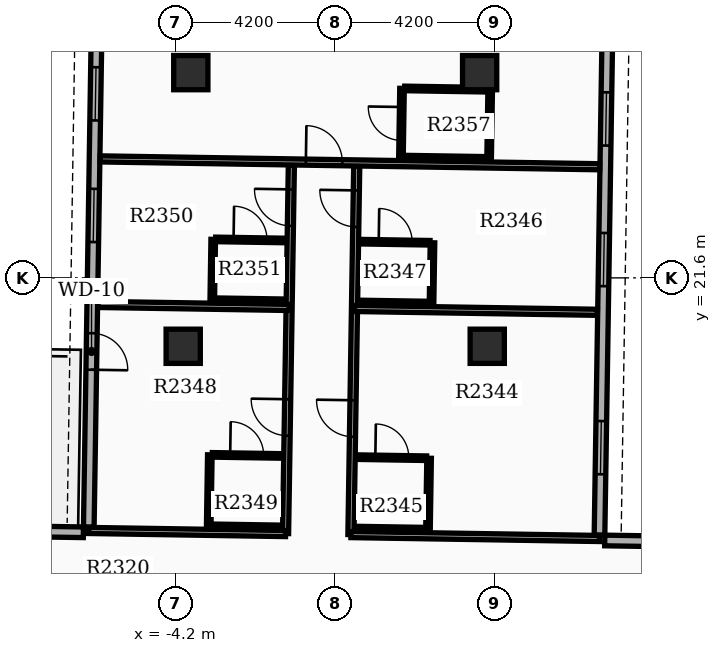
"""IFC4 building model, lengths in metres.
Left out: names, types, materials, properties, quantities, classifications, styles, units other than length and angle.
Written with IfcOpenShell. Run it as: python <this file> out.ifc"""

import sys

from ifc_helpers import new_model, si_unit, direction, frame, frame_2d, origin, origin_2d, place, context, subcontext, project, spatial, rectangle, extrude, element, fill, save


model = new_model("IFC4")
c1 = context("Model", 3, precision=1e-05, world=origin(), true_north=direction((0.0, 1.0)))
c2 = subcontext(c1, "Body", "Model", "MODEL_VIEW")
j1 = project(units=[si_unit("LENGTHUNIT", "METRE"), si_unit("PLANEANGLEUNIT", "RADIAN")], contexts=[c1])
p1 = place(None, origin())
s1 = spatial("IfcSite", under=j1, at=p1, CompositionType="ELEMENT")
p2 = place(p1, origin())
s2 = spatial("IfcBuilding", under=s1, at=p2, CompositionType="ELEMENT")
p3 = place(p2, frame((0.0, 0.0, 148.8)))
s3 = spatial("IfcBuildingStorey", under=s2, at=p3, CompositionType="ELEMENT", Elevation=148.8)
for number, where, z_axis, x_axis in (
    (1, (-4.0, 19.8, 0.0), (0.0, 0.0, 1.0), (1.0, 0.0, 0.0)),
    (2, (4.0, 19.8, 0.0), (0.0, 0.0, 1.0), (1.0, 0.0, 0.0)),
    (3, (-3.8, 27.0, 0.0), (0.0, 0.0, 1.0), (1.0, 0.0, 0.0)),
    (4, (3.8, 27.0, 0.0), (0.0, 0.0, 1.0), (1.0, 0.0, 0.0)),
):
    element("IfcColumn", number, at=place(p3, frame(where, z_axis=z_axis, x_axis=x_axis)), inside=s3, PredefinedType="COLUMN", context=c2, shape_type="SweptSolid", body=[
        extrude(rectangle(XDim=0.9, YDim=0.9, at=origin_2d()), origin(), (0.0, 0.0, 1.0), 3.9),
    ])
p4 = place(p3, frame((6.954, 14.833, 0.0), z_axis=(0.0, 0.0, 1.0), x_axis=(0.015705059908, 0.999876667941, 0.0)))
e5 = element("IfcWall", 5, at=p4, inside=s3, PredefinedType="STANDARD", context=c2, shape_type="SweptSolid", body=[
    extrude(rectangle(XDim=20.1, YDim=0.28, at=frame_2d((10.05, 0.0))), origin(), (0.0, 0.0, 1.0), 2.97),
])
p5 = place(p4, frame((1.6, 0.0, 0.8)))
e6 = element("IfcOpeningElement", 6, at=p5, cuts=e5, PredefinedType="OPENING", context=c2, shape_type="SweptSolid", body=[
    extrude(rectangle(XDim=1.4, YDim=1.6, at=frame_2d((0.7, 0.8))), frame((0.0, 0.15, 0.0), z_axis=(0.0, -1.0, 0.0), x_axis=(1.0, 0.0, 0.0)), (0.0, 0.0, 1.0), 0.3),
])
p6 = place(p4, frame((6.55, 0.0, 0.8)))
e7 = element("IfcOpeningElement", 7, at=p6, cuts=e5, PredefinedType="OPENING", context=c2, shape_type="SweptSolid", body=[
    extrude(rectangle(XDim=1.4, YDim=1.6, at=frame_2d((0.7, 0.8))), frame((0.0, 0.15, 0.0), z_axis=(0.0, -1.0, 0.0), x_axis=(1.0, 0.0, 0.0)), (0.0, 0.0, 1.0), 0.3),
])
p7 = place(p4, frame((10.25, 0.0, 0.8)))
e8 = element("IfcOpeningElement", 8, at=p7, cuts=e5, PredefinedType="OPENING", context=c2, shape_type="SweptSolid", body=[
    extrude(rectangle(XDim=1.4, YDim=1.6, at=frame_2d((0.7, 0.8))), frame((0.0, 0.15, 0.0), z_axis=(0.0, -1.0, 0.0), x_axis=(1.0, 0.0, 0.0)), (0.0, 0.0, 1.0), 0.3),
])
p8 = place(p4, frame((13.45, 0.0, 0.8)))
e9 = element("IfcOpeningElement", 9, at=p8, cuts=e5, PredefinedType="OPENING", context=c2, shape_type="SweptSolid", body=[
    extrude(rectangle(XDim=1.4, YDim=1.6, at=frame_2d((0.7, 0.8))), frame((0.0, 0.15, 0.0), z_axis=(0.0, -1.0, 0.0), x_axis=(1.0, 0.0, 0.0)), (0.0, 0.0, 1.0), 0.3),
])
p9 = place(p3, frame((-6.169, 35.141, 0.0), z_axis=(0.0, 0.0, 1.0), x_axis=(-0.01571739401, -0.999876474133, 0.0)))
e10 = element("IfcWall", 10, at=p9, inside=s3, PredefinedType="STANDARD", context=c2, shape_type="SweptSolid", body=[
    extrude(rectangle(XDim=20.1, YDim=0.28, at=frame_2d((10.05, 0.0))), origin(), (0.0, 0.0, 1.0), 2.97),
])
p10 = place(p9, frame((1.6, 0.0, 0.8)))
e11 = element("IfcOpeningElement", 11, at=p10, cuts=e10, PredefinedType="OPENING", context=c2, shape_type="SweptSolid", body=[
    extrude(rectangle(XDim=1.4, YDim=1.6, at=frame_2d((0.7, 0.8))), frame((0.0, 0.15, 0.0), z_axis=(0.0, -1.0, 0.0), x_axis=(1.0, 0.0, 0.0)), (0.0, 0.0, 1.0), 0.3),
])
p11 = place(p9, frame((4.8, 0.0, 0.8)))
e12 = element("IfcOpeningElement", 12, at=p11, cuts=e10, PredefinedType="OPENING", context=c2, shape_type="SweptSolid", body=[
    extrude(rectangle(XDim=1.4, YDim=1.6, at=frame_2d((0.7, 0.8))), frame((0.0, 0.15, 0.0), z_axis=(0.0, -1.0, 0.0), x_axis=(1.0, 0.0, 0.0)), (0.0, 0.0, 1.0), 0.3),
])
p12 = place(p9, frame((8.0, 0.0, 0.8)))
e13 = element("IfcOpeningElement", 13, at=p12, cuts=e10, PredefinedType="OPENING", context=c2, shape_type="SweptSolid", body=[
    extrude(rectangle(XDim=1.4, YDim=1.6, at=frame_2d((0.7, 0.8))), frame((0.0, 0.15, 0.0), z_axis=(0.0, -1.0, 0.0), x_axis=(1.0, 0.0, 0.0)), (0.0, 0.0, 1.0), 0.3),
])
p13 = place(p9, frame((11.2, 0.0, 0.8)))
e14 = element("IfcOpeningElement", 14, at=p13, cuts=e10, PredefinedType="OPENING", context=c2, shape_type="SweptSolid", body=[
    extrude(rectangle(XDim=1.4, YDim=1.6, at=frame_2d((0.7, 0.8))), frame((0.0, 0.15, 0.0), z_axis=(0.0, -1.0, 0.0), x_axis=(1.0, 0.0, 0.0)), (0.0, 0.0, 1.0), 0.3),
])
p14 = place(p9, frame((15.0, 0.0, 0.0)))
e15 = element("IfcOpeningElement", 15, at=p14, cuts=e10, PredefinedType="OPENING", context=c2, shape_type="SweptSolid", body=[
    extrude(rectangle(XDim=0.96, YDim=2.1, at=frame_2d((0.48, 1.05))), frame((0.0, 0.15, 0.0), z_axis=(0.0, -1.0, 0.0), x_axis=(1.0, 0.0, 0.0)), (0.0, 0.0, 1.0), 0.3),
])
p15 = place(p3, frame((13.391, 14.592, 0.0), z_axis=(0.0, 0.0, 1.0), x_axis=(-0.999876833368, 0.015694524359, 0.0)))
e16 = element("IfcWall", 16, at=p15, inside=s3, PredefinedType="STANDARD", context=c2, shape_type="SweptSolid", body=[
    extrude(rectangle(XDim=6.3, YDim=0.28, at=frame_2d((3.15, 0.0))), origin(), (0.0, 0.0, 1.0), 2.97),
])
p16 = place(p3, frame((-12.926, 15.005, 0.0), z_axis=(0.0, 0.0, 1.0), x_axis=(0.999876823822, -0.015695132501, 0.0)))
e17 = element("IfcWall", 17, at=p16, inside=s3, PredefinedType="STANDARD", context=c2, shape_type="SweptSolid", body=[
    extrude(rectangle(XDim=6.3, YDim=0.28, at=frame_2d((3.15, 0.0))), origin(), (0.0, 0.0, 1.0), 2.97),
])
p17 = place(p3, frame((0.413, 14.845, 0.0), z_axis=(0.0, 0.0, 1.0), x_axis=(0.015730426869, 0.999876269181, 0.0)))
e18 = element("IfcWall", 18, at=p17, inside=s3, PredefinedType="PARTITIONING", context=c2, shape_type="SweptSolid", body=[
    extrude(rectangle(XDim=9.7, YDim=0.16, at=frame_2d((4.85, 0.0))), origin(), (0.0, 0.0, 1.0), 2.96),
])
p18 = place(p17, frame((2.575, 0.0, 0.0)))
e19 = element("IfcOpeningElement", 19, at=p18, cuts=e18, PredefinedType="OPENING", context=c2, shape_type="SweptSolid", body=[
    extrude(rectangle(XDim=0.96, YDim=2.15, at=frame_2d((0.48, 1.075))), frame((0.0, 0.09, 0.0), z_axis=(0.0, -1.0, 0.0), x_axis=(1.0, 0.0, 0.0)), (0.0, 0.0, 1.0), 0.18),
])
p19 = place(p17, frame((8.097, 0.0, 0.0)))
e20 = element("IfcOpeningElement", 20, at=p19, cuts=e18, PredefinedType="OPENING", context=c2, shape_type="SweptSolid", body=[
    extrude(rectangle(XDim=0.96, YDim=2.15, at=frame_2d((0.48, 1.075))), frame((0.0, 0.09, 0.0), z_axis=(0.0, -1.0, 0.0), x_axis=(1.0, 0.0, 0.0)), (0.0, 0.0, 1.0), 0.18),
])
p20 = place(p3, frame((0.413, 14.845, 0.0), z_axis=(0.0, 0.0, 1.0), x_axis=(0.999877084909, -0.015678490784, 0.0)))
e21 = element("IfcWall", 21, at=p20, inside=s3, PredefinedType="PARTITIONING", context=c2, shape_type="SweptSolid", body=[
    extrude(rectangle(XDim=6.54, YDim=0.16, at=frame_2d((3.27, 0.0))), origin(), (0.0, 0.0, 1.0), 2.96),
])
p21 = place(p3, frame((0.507, 20.795, 0.0), z_axis=(0.0, 0.0, 1.0), x_axis=(0.999876183745, -0.015735856515, 0.0)))
e22 = element("IfcWall", 22, at=p21, inside=s3, PredefinedType="PARTITIONING", context=c2, shape_type="SweptSolid", body=[
    extrude(rectangle(XDim=6.392, YDim=0.16, at=frame_2d((3.196, 0.0))), origin(), (0.0, 0.0, 1.0), 2.96),
])
p22 = place(p3, frame((0.585, 16.883, 0.0), z_axis=(0.0, 0.0, 1.0), x_axis=(0.999876836305, -0.015694337248, 0.0)))
e23 = element("IfcWall", 23, at=p22, inside=s3, PredefinedType="PARTITIONING", context=c2, shape_type="SweptSolid", body=[
    extrude(rectangle(XDim=1.82, YDim=0.12, at=frame_2d((0.91, 0.0))), origin(), (0.0, 0.0, 1.0), 2.96),
])
p23 = place(p22, frame((0.47, 0.0, 0.0)))
e24 = element("IfcOpeningElement", 24, at=p23, cuts=e23, PredefinedType="OPENING", context=c2, shape_type="SweptSolid", body=[
    extrude(rectangle(XDim=0.88, YDim=2.1, at=frame_2d((0.44, 1.05))), frame((0.0, 0.07, 0.0), z_axis=(0.0, -1.0, 0.0), x_axis=(1.0, 0.0, 0.0)), (0.0, 0.0, 1.0), 0.14),
])
p24 = place(p3, frame((0.556, 15.003, 0.0), z_axis=(0.0, 0.0, 1.0), x_axis=(0.999876836305, -0.015694337248, 0.0)))
e25 = element("IfcWall", 25, at=p24, inside=s3, PredefinedType="PARTITIONING", context=c2, shape_type="SweptSolid", body=[
    extrude(rectangle(XDim=1.82, YDim=0.12, at=frame_2d((0.91, 0.0))), origin(), (0.0, 0.0, 1.0), 2.96),
])
p25 = place(p3, frame((2.44, 14.973, 0.0), z_axis=(0.0, 0.0, 1.0), x_axis=(0.01571234584, 0.999876553475, 0.0)))
e26 = element("IfcWall", 26, at=p25, inside=s3, PredefinedType="PARTITIONING", context=c2, shape_type="SweptSolid", body=[
    extrude(rectangle(XDim=1.88, YDim=0.12, at=frame_2d((0.94, 0.0))), origin(), (0.0, 0.0, 1.0), 2.96),
])
p26 = place(p3, frame((0.674, 22.552, 0.0), z_axis=(0.0, 0.0, 1.0), x_axis=(0.999876836305, -0.015694337248, 0.0)))
e27 = element("IfcWall", 27, at=p26, inside=s3, PredefinedType="PARTITIONING", context=c2, shape_type="SweptSolid", body=[
    extrude(rectangle(XDim=1.82, YDim=0.12, at=frame_2d((0.91, 0.0))), origin(), (0.0, 0.0, 1.0), 2.96),
])
p27 = place(p26, frame((0.47, 0.0, 0.0)))
e28 = element("IfcOpeningElement", 28, at=p27, cuts=e27, PredefinedType="OPENING", context=c2, shape_type="SweptSolid", body=[
    extrude(rectangle(XDim=0.88, YDim=2.1, at=frame_2d((0.44, 1.05))), frame((0.0, 0.07, 0.0), z_axis=(0.0, -1.0, 0.0), x_axis=(1.0, 0.0, 0.0)), (0.0, 0.0, 1.0), 0.14),
])
p28 = place(p3, frame((0.649, 20.952, 0.0), z_axis=(0.0, 0.0, 1.0), x_axis=(0.999876836305, -0.015694337248, 0.0)))
e29 = element("IfcWall", 29, at=p28, inside=s3, PredefinedType="PARTITIONING", context=c2, shape_type="SweptSolid", body=[
    extrude(rectangle(XDim=1.82, YDim=0.12, at=frame_2d((0.91, 0.0))), origin(), (0.0, 0.0, 1.0), 2.96),
])
p29 = place(p3, frame((2.534, 20.923, 0.0), z_axis=(0.0, 0.0, 1.0), x_axis=(0.015716050513, 0.999876495251, 0.0)))
e30 = element("IfcWall", 30, at=p29, inside=s3, PredefinedType="PARTITIONING", context=c2, shape_type="SweptSolid", body=[
    extrude(rectangle(XDim=1.6, YDim=0.12, at=frame_2d((0.8, 0.0))), origin(), (0.0, 0.0, 1.0), 2.96),
])
p30 = place(p3, frame((-1.307, 14.872, 0.0), z_axis=(0.0, 0.0, 1.0), x_axis=(0.015705264399, 0.999876664729, 0.0)))
e31 = element("IfcWall", 31, at=p30, inside=s3, PredefinedType="PARTITIONING", context=c2, shape_type="SweptSolid", body=[
    extrude(rectangle(XDim=9.7, YDim=0.16, at=frame_2d((4.85, 0.0))), origin(), (0.0, 0.0, 1.0), 2.96),
])
p31 = place(p30, frame((2.575, 0.0, 0.0)))
e32 = element("IfcOpeningElement", 32, at=p31, cuts=e31, PredefinedType="OPENING", context=c2, shape_type="SweptSolid", body=[
    extrude(rectangle(XDim=0.96, YDim=2.15, at=frame_2d((0.48, 1.075))), frame((0.0, 0.09, 0.0), z_axis=(0.0, -1.0, 0.0), x_axis=(1.0, 0.0, 0.0)), (0.0, 0.0, 1.0), 0.18),
])
p32 = place(p30, frame((8.097, 0.0, 0.0)))
e33 = element("IfcOpeningElement", 33, at=p32, cuts=e31, PredefinedType="OPENING", context=c2, shape_type="SweptSolid", body=[
    extrude(rectangle(XDim=0.96, YDim=2.15, at=frame_2d((0.48, 1.075))), frame((0.0, 0.09, 0.0), z_axis=(0.0, -1.0, 0.0), x_axis=(1.0, 0.0, 0.0)), (0.0, 0.0, 1.0), 0.18),
])
p33 = place(p3, frame((-1.307, 14.872, 0.0), z_axis=(0.0, 0.0, 1.0), x_axis=(-0.999876822016, 0.01569524756, 0.0)))
e34 = element("IfcWall", 34, at=p33, inside=s3, PredefinedType="PARTITIONING", context=c2, shape_type="SweptSolid", body=[
    extrude(rectangle(XDim=5.18, YDim=0.16, at=frame_2d((2.59, 0.0))), origin(), (0.0, 0.0, 1.0), 2.96),
])
p34 = place(p3, frame((-1.213, 20.822, 0.0), z_axis=(0.0, 0.0, 1.0), x_axis=(-0.999876431484, 0.015720106939, 0.0)))
e35 = element("IfcWall", 35, at=p34, inside=s3, PredefinedType="PARTITIONING", context=c2, shape_type="SweptSolid", body=[
    extrude(rectangle(XDim=5.032, YDim=0.16, at=frame_2d((2.516, 0.0))), origin(), (0.0, 0.0, 1.0), 2.96),
])
p35 = place(p3, frame((-3.234, 16.943, 0.0), z_axis=(0.0, 0.0, 1.0), x_axis=(0.999876836305, -0.015694337248, 0.0)))
e36 = element("IfcWall", 36, at=p35, inside=s3, PredefinedType="PARTITIONING", context=c2, shape_type="SweptSolid", body=[
    extrude(rectangle(XDim=1.82, YDim=0.12, at=frame_2d((0.91, 0.0))), origin(), (0.0, 0.0, 1.0), 2.96),
])
p36 = place(p35, frame((0.47, 0.0, 0.0)))
e37 = element("IfcOpeningElement", 37, at=p36, cuts=e36, PredefinedType="OPENING", context=c2, shape_type="SweptSolid", body=[
    extrude(rectangle(XDim=0.88, YDim=2.1, at=frame_2d((0.44, 1.05))), frame((0.0, 0.07, 0.0), z_axis=(0.0, -1.0, 0.0), x_axis=(1.0, 0.0, 0.0)), (0.0, 0.0, 1.0), 0.14),
])
p37 = place(p3, frame((-3.264, 15.063, 0.0), z_axis=(0.0, 0.0, 1.0), x_axis=(0.999876836305, -0.015694337248, 0.0)))
e38 = element("IfcWall", 38, at=p37, inside=s3, PredefinedType="PARTITIONING", context=c2, shape_type="SweptSolid", body=[
    extrude(rectangle(XDim=1.82, YDim=0.12, at=frame_2d((0.91, 0.0))), origin(), (0.0, 0.0, 1.0), 2.96),
])
p38 = place(p3, frame((-3.329, 15.064, 0.0), z_axis=(0.0, 0.0, 1.0), x_axis=(0.015714386166, 0.99987652141, 0.0)))
e39 = element("IfcWall", 39, at=p38, inside=s3, PredefinedType="PARTITIONING", context=c2, shape_type="SweptSolid", body=[
    extrude(rectangle(XDim=1.88, YDim=0.12, at=frame_2d((0.94, 0.0))), origin(), (0.0, 0.0, 1.0), 2.96),
])
p39 = place(p3, frame((-3.145, 22.612, 0.0), z_axis=(0.0, 0.0, 1.0), x_axis=(0.999874722342, -0.015828443418, 0.0)))
e40 = element("IfcWall", 40, at=p39, inside=s3, PredefinedType="PARTITIONING", context=c2, shape_type="SweptSolid", body=[
    extrude(rectangle(XDim=1.82, YDim=0.12, at=frame_2d((0.91, 0.0))), origin(), (0.0, 0.0, 1.0), 2.96),
])
p40 = place(p39, frame((0.47, 0.0, 0.0)))
e41 = element("IfcOpeningElement", 41, at=p40, cuts=e40, PredefinedType="OPENING", context=c2, shape_type="SweptSolid", body=[
    extrude(rectangle(XDim=0.88, YDim=2.1, at=frame_2d((0.44, 1.05))), frame((0.0, 0.07, 0.0), z_axis=(0.0, -1.0, 0.0), x_axis=(1.0, 0.0, 0.0)), (0.0, 0.0, 1.0), 0.14),
])
p41 = place(p3, frame((-3.17, 21.012, 0.0), z_axis=(0.0, 0.0, 1.0), x_axis=(0.999876836305, -0.015694337248, 0.0)))
e42 = element("IfcWall", 42, at=p41, inside=s3, PredefinedType="PARTITIONING", context=c2, shape_type="SweptSolid", body=[
    extrude(rectangle(XDim=1.82, YDim=0.12, at=frame_2d((0.91, 0.0))), origin(), (0.0, 0.0, 1.0), 2.96),
])
p42 = place(p3, frame((-3.235, 21.013, 0.0), z_axis=(0.0, 0.0, 1.0), x_axis=(0.015716050513, 0.999876495251, 0.0)))
e43 = element("IfcWall", 43, at=p42, inside=s3, PredefinedType="PARTITIONING", context=c2, shape_type="SweptSolid", body=[
    extrude(rectangle(XDim=1.6, YDim=0.12, at=frame_2d((0.8, 0.0))), origin(), (0.0, 0.0, 1.0), 2.96),
])
p43 = place(p3, frame((-6.184, 24.73, 0.0), z_axis=(0.0, 0.0, 1.0), x_axis=(0.999876528878, -0.015713911007, 0.0)))
e44 = element("IfcWall", 44, at=p43, inside=s3, PredefinedType="PARTITIONING", context=c2, shape_type="SweptSolid", body=[
    extrude(rectangle(XDim=13.144, YDim=0.16, at=frame_2d((6.572, 0.0))), origin(), (0.0, 0.0, 1.0), 2.96),
])
p44 = place(p43, frame((5.412, 0.0, 0.0)))
e45 = element("IfcOpeningElement", 45, at=p44, cuts=e44, PredefinedType="OPENING", context=c2, shape_type="SweptSolid", body=[
    extrude(rectangle(XDim=0.96, YDim=2.15, at=frame_2d((0.48, 1.075))), frame((0.0, 0.09, 0.0), z_axis=(0.0, -1.0, 0.0), x_axis=(1.0, 0.0, 0.0)), (0.0, 0.0, 1.0), 0.18),
])
p45 = place(p3, frame((1.729, 24.766, 0.0), z_axis=(0.0, 0.0, 1.0), x_axis=(0.015694337248, 0.999876836305, 0.0)))
e46 = element("IfcWall", 46, at=p45, inside=s3, PredefinedType="PARTITIONING", context=c2, shape_type="SweptSolid", body=[
    extrude(rectangle(XDim=1.82, YDim=0.12, at=frame_2d((0.91, 0.0))), origin(), (0.0, 0.0, 1.0), 2.96),
])
p46 = place(p45, frame((0.45, 0.0, 0.0)))
e47 = element("IfcOpeningElement", 47, at=p46, cuts=e46, PredefinedType="OPENING", context=c2, shape_type="SweptSolid", body=[
    extrude(rectangle(XDim=0.88, YDim=2.1, at=frame_2d((0.44, 1.05))), frame((0.0, 0.07, 0.0), z_axis=(0.0, -1.0, 0.0), x_axis=(1.0, 0.0, 0.0)), (0.0, 0.0, 1.0), 0.14),
])
p47 = place(p3, frame((4.049, 24.729, 0.0), z_axis=(0.0, 0.0, 1.0), x_axis=(0.015694337248, 0.999876836305, 0.0)))
e48 = element("IfcWall", 48, at=p47, inside=s3, PredefinedType="PARTITIONING", context=c2, shape_type="SweptSolid", body=[
    extrude(rectangle(XDim=1.82, YDim=0.12, at=frame_2d((0.91, 0.0))), origin(), (0.0, 0.0, 1.0), 2.96),
])
for number, where, z_axis, x_axis in (
    (49, (1.799, 24.765, 0.0), (0.0, 0.0, 1.0), (1.0, -0.016, 0.0)),
    (50, (1.828, 26.585, 0.0), (0.0, 0.0, 1.0), (1.0, -0.016, 0.0)),
):
    element("IfcWall", number, at=place(p3, frame(where, z_axis=z_axis, x_axis=x_axis)), inside=s3, PredefinedType="PARTITIONING", context=c2, shape_type="SweptSolid", body=[
        extrude(rectangle(XDim=2.18, YDim=0.12, at=frame_2d((1.09, 0.0))), origin(), (0.0, 0.0, 1.0), 2.96),
    ])
p48 = place(p5, origin())
e51 = element("IfcWindow", 51, at=p48, inside=s3, PartitioningType="SINGLE_PANEL", PredefinedType="WINDOW", context=c2, shape_type="SweptSolid", body=[
    extrude(rectangle(XDim=1.4, YDim=1.6, at=frame_2d((0.7, 0.8))), frame((0.0, 0.03, 0.0), z_axis=(0.0, -1.0, 0.0), x_axis=(1.0, 0.0, 0.0)), (0.0, 0.0, 1.0), 0.06),
])
fill(e6, e51)
p49 = place(p6, origin())
e52 = element("IfcWindow", 52, at=p49, inside=s3, PartitioningType="SINGLE_PANEL", PredefinedType="WINDOW", context=c2, shape_type="SweptSolid", body=[
    extrude(rectangle(XDim=1.4, YDim=1.6, at=frame_2d((0.7, 0.8))), frame((0.0, 0.03, 0.0), z_axis=(0.0, -1.0, 0.0), x_axis=(1.0, 0.0, 0.0)), (0.0, 0.0, 1.0), 0.06),
])
fill(e7, e52)
p50 = place(p7, origin())
e53 = element("IfcWindow", 53, at=p50, inside=s3, PartitioningType="SINGLE_PANEL", PredefinedType="WINDOW", context=c2, shape_type="SweptSolid", body=[
    extrude(rectangle(XDim=1.4, YDim=1.6, at=frame_2d((0.7, 0.8))), frame((0.0, 0.03, 0.0), z_axis=(0.0, -1.0, 0.0), x_axis=(1.0, 0.0, 0.0)), (0.0, 0.0, 1.0), 0.06),
])
fill(e8, e53)
p51 = place(p12, origin())
e54 = element("IfcWindow", 54, at=p51, inside=s3, PartitioningType="SINGLE_PANEL", PredefinedType="WINDOW", context=c2, shape_type="SweptSolid", body=[
    extrude(rectangle(XDim=1.4, YDim=1.6, at=frame_2d((0.7, 0.8))), frame((0.0, 0.03, 0.0), z_axis=(0.0, -1.0, 0.0), x_axis=(1.0, 0.0, 0.0)), (0.0, 0.0, 1.0), 0.06),
])
fill(e13, e54)
p52 = place(p13, origin())
e55 = element("IfcWindow", 55, at=p52, inside=s3, PartitioningType="SINGLE_PANEL", PredefinedType="WINDOW", context=c2, shape_type="SweptSolid", body=[
    extrude(rectangle(XDim=1.4, YDim=1.6, at=frame_2d((0.7, 0.8))), frame((0.0, 0.03, 0.0), z_axis=(0.0, -1.0, 0.0), x_axis=(1.0, 0.0, 0.0)), (0.0, 0.0, 1.0), 0.06),
])
fill(e14, e55)
p53 = place(p14, origin())
e56 = element("IfcDoor", 56, at=p53, inside=s3, OperationType="SINGLE_SWING_RIGHT", PredefinedType="DOOR", context=c2, shape_type="SweptSolid", body=[
    extrude(rectangle(XDim=0.96, YDim=2.1, at=frame_2d((0.48, 1.05))), frame((0.0, 0.025, 0.0), z_axis=(0.0, -1.0, 0.0), x_axis=(1.0, 0.0, 0.0)), (0.0, 0.0, 1.0), 0.05),
])
fill(e15, e56)
p54 = place(p18, origin())
e57 = element("IfcDoor", 57, at=p54, inside=s3, OperationType="SINGLE_SWING_RIGHT", PredefinedType="DOOR", context=c2, shape_type="SweptSolid", body=[
    extrude(rectangle(XDim=0.96, YDim=2.15, at=frame_2d((0.48, 1.075))), frame((0.0, 0.025, 0.0), z_axis=(0.0, -1.0, 0.0), x_axis=(1.0, 0.0, 0.0)), (0.0, 0.0, 1.0), 0.05),
])
fill(e19, e57)
p55 = place(p23, origin())
e58 = element("IfcDoor", 58, at=p55, inside=s3, OperationType="SINGLE_SWING_LEFT", PredefinedType="DOOR", context=c2, shape_type="SweptSolid", body=[
    extrude(rectangle(XDim=0.88, YDim=2.1, at=frame_2d((0.44, 1.05))), frame((0.0, 0.025, 0.0), z_axis=(0.0, -1.0, 0.0), x_axis=(1.0, 0.0, 0.0)), (0.0, 0.0, 1.0), 0.05),
])
fill(e24, e58)
p56 = place(p19, origin())
e59 = element("IfcDoor", 59, at=p56, inside=s3, OperationType="SINGLE_SWING_RIGHT", PredefinedType="DOOR", context=c2, shape_type="SweptSolid", body=[
    extrude(rectangle(XDim=0.96, YDim=2.15, at=frame_2d((0.48, 1.075))), frame((0.0, 0.025, 0.0), z_axis=(0.0, -1.0, 0.0), x_axis=(1.0, 0.0, 0.0)), (0.0, 0.0, 1.0), 0.05),
])
fill(e20, e59)
p57 = place(p27, origin())
e60 = element("IfcDoor", 60, at=p57, inside=s3, OperationType="SINGLE_SWING_LEFT", PredefinedType="DOOR", context=c2, shape_type="SweptSolid", body=[
    extrude(rectangle(XDim=0.88, YDim=2.1, at=frame_2d((0.44, 1.05))), frame((0.0, 0.025, 0.0), z_axis=(0.0, -1.0, 0.0), x_axis=(1.0, 0.0, 0.0)), (0.0, 0.0, 1.0), 0.05),
])
fill(e28, e60)
p58 = place(p31, origin())
e61 = element("IfcDoor", 61, at=p58, inside=s3, OperationType="SINGLE_SWING_RIGHT", PredefinedType="DOOR", context=c2, shape_type="SweptSolid", body=[
    extrude(rectangle(XDim=0.96, YDim=2.15, at=frame_2d((0.48, 1.075))), frame((0.0, 0.025, 0.0), z_axis=(0.0, -1.0, 0.0), x_axis=(1.0, 0.0, 0.0)), (0.0, 0.0, 1.0), 0.05),
])
fill(e32, e61)
p59 = place(p36, origin())
e62 = element("IfcDoor", 62, at=p59, inside=s3, OperationType="SINGLE_SWING_LEFT", PredefinedType="DOOR", context=c2, shape_type="SweptSolid", body=[
    extrude(rectangle(XDim=0.88, YDim=2.1, at=frame_2d((0.44, 1.05))), frame((0.0, 0.025, 0.0), z_axis=(0.0, -1.0, 0.0), x_axis=(1.0, 0.0, 0.0)), (0.0, 0.0, 1.0), 0.05),
])
fill(e37, e62)
p60 = place(p32, origin())
e63 = element("IfcDoor", 63, at=p60, inside=s3, OperationType="SINGLE_SWING_RIGHT", PredefinedType="DOOR", context=c2, shape_type="SweptSolid", body=[
    extrude(rectangle(XDim=0.96, YDim=2.15, at=frame_2d((0.48, 1.075))), frame((0.0, 0.025, 0.0), z_axis=(0.0, -1.0, 0.0), x_axis=(1.0, 0.0, 0.0)), (0.0, 0.0, 1.0), 0.05),
])
fill(e33, e63)
p61 = place(p40, origin())
e64 = element("IfcDoor", 64, at=p61, inside=s3, OperationType="SINGLE_SWING_LEFT", PredefinedType="DOOR", context=c2, shape_type="SweptSolid", body=[
    extrude(rectangle(XDim=0.88, YDim=2.1, at=frame_2d((0.44, 1.05))), frame((0.0, 0.025, 0.0), z_axis=(0.0, -1.0, 0.0), x_axis=(1.0, 0.0, 0.0)), (0.0, 0.0, 1.0), 0.05),
])
fill(e41, e64)
p62 = place(p44, origin())
e65 = element("IfcDoor", 65, at=p62, inside=s3, OperationType="SINGLE_SWING_LEFT", PredefinedType="DOOR", context=c2, shape_type="SweptSolid", body=[
    extrude(rectangle(XDim=0.96, YDim=2.15, at=frame_2d((0.48, 1.075))), frame((0.0, 0.025, 0.0), z_axis=(0.0, -1.0, 0.0), x_axis=(1.0, 0.0, 0.0)), (0.0, 0.0, 1.0), 0.05),
])
fill(e45, e65)
p63 = place(p46, origin())
e66 = element("IfcDoor", 66, at=p63, inside=s3, OperationType="SINGLE_SWING_RIGHT", PredefinedType="DOOR", context=c2, shape_type="SweptSolid", body=[
    extrude(rectangle(XDim=0.88, YDim=2.1, at=frame_2d((0.44, 1.05))), frame((0.0, 0.025, 0.0), z_axis=(0.0, -1.0, 0.0), x_axis=(1.0, 0.0, 0.0)), (0.0, 0.0, 1.0), 0.05),
])
fill(e47, e66)
save(model, sys.argv[1])
